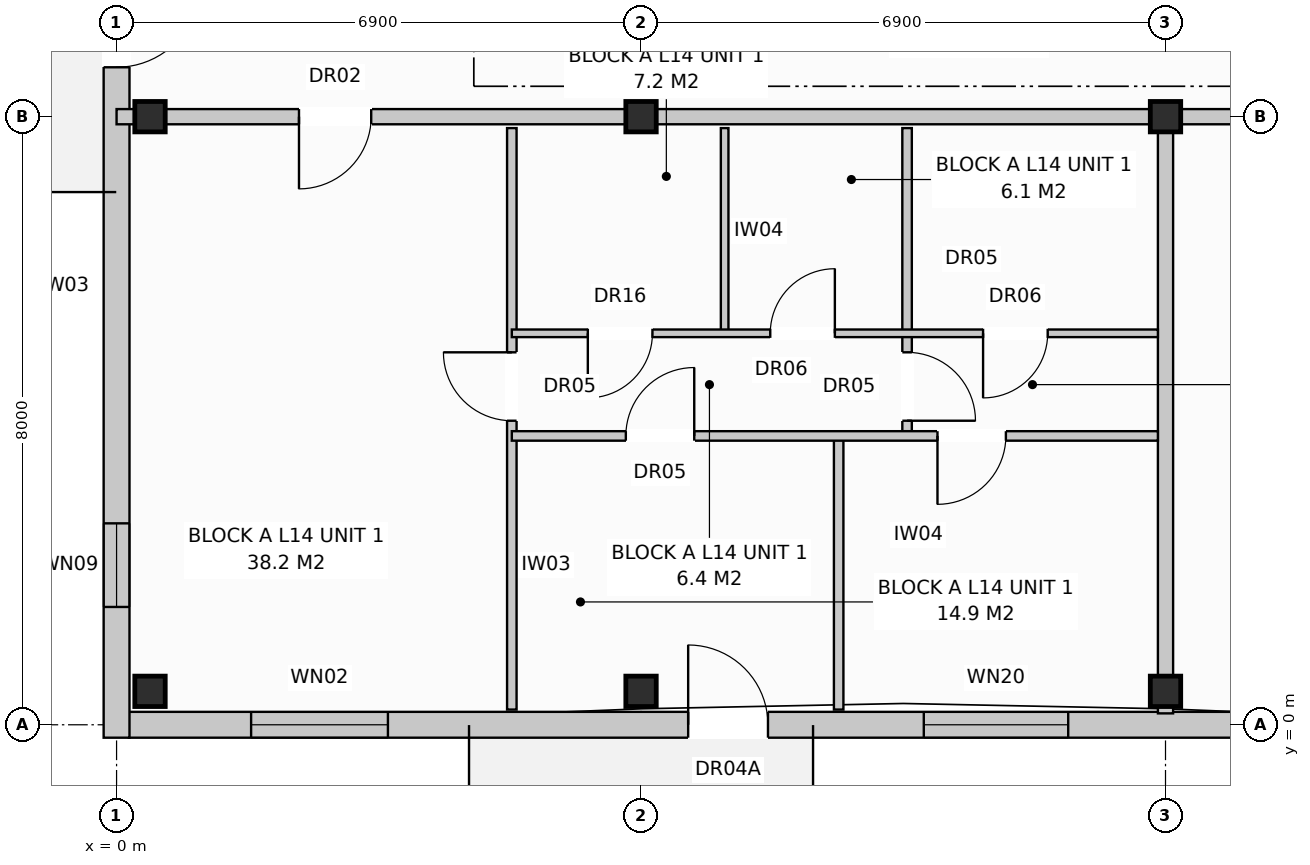
"""IFC4 building model, lengths in metres.
Left out: names, types, materials, properties, quantities, classifications, styles, units other than length and angle.
Written with IfcOpenShell. Run it as: python <this file> out.ifc"""

import sys

from ifc_helpers import new_model, si_unit, direction, frame, frame_2d, origin, origin_with_axes, origin_2d, place, context, subcontext, project, spatial, rectangle, extrude, element, fill, save


model = new_model("IFC4")
c1 = context("Model", 3, precision=1e-05, world=origin(), true_north=direction((0.0, 1.0)))
c2 = subcontext(c1, "Body", "Model", "MODEL_VIEW")
j1 = project(units=[si_unit("LENGTHUNIT", "METRE"), si_unit("PLANEANGLEUNIT", "RADIAN")], contexts=[c1])
p1 = place(None, origin())
s1 = spatial("IfcSite", under=j1, at=p1, CompositionType="ELEMENT")
p2 = place(p1, origin())
s2 = spatial("IfcBuilding", under=s1, at=p2, CompositionType="ELEMENT")
p3 = place(p2, frame((0.0, 0.0, 46.4)))
s3 = spatial("IfcBuildingStorey", under=s2, at=p3, CompositionType="ELEMENT", Elevation=46.4)
for number, where, z_axis, x_axis in (
    (1, (0.44, 0.44, 0.0), (0.0, 0.0, 1.0), (1.0, 0.0, 0.0)),
    (2, (0.44, 8.0, 0.0), (0.0, 0.0, 1.0), (1.0, 0.0, 0.0)),
    (3, (6.9, 0.44, 0.0), (0.0, 0.0, 1.0), (1.0, 0.0, 0.0)),
    (4, (6.9, 8.0, 0.0), (0.0, 0.0, 1.0), (1.0, 0.0, 0.0)),
    (5, (13.8, 0.44, 0.0), (0.0, 0.0, 1.0), (1.0, 0.0, 0.0)),
    (6, (13.8, 8.0, 0.0), (0.0, 0.0, 1.0), (1.0, 0.0, 0.0)),
):
    element("IfcColumn", number, at=place(p3, frame(where, z_axis=z_axis, x_axis=x_axis)), inside=s3, PredefinedType="COLUMN", context=c2, shape_type="SweptSolid", body=[
        extrude(rectangle(XDim=0.4, YDim=0.4, at=origin_2d()), origin(), (0.0, 0.0, 1.0), 3.2),
    ])
p4 = place(p3, frame((0.16, 0.0, 0.0), z_axis=(0.0, 0.0, 1.0), x_axis=(1.0, 0.0, 0.0)))
e7 = element("IfcWall", 7, at=p4, inside=s3, PredefinedType="STANDARD", context=c2, shape_type="SweptSolid", body=[
    extrude(rectangle(XDim=41.08, YDim=0.34, at=frame_2d((20.54, 0.0))), origin(), (0.0, 0.0, 1.0), 2.91),
])
p5 = place(p4, frame((7.36, 0.0, 0.0)))
e8 = element("IfcOpeningElement", 8, at=p5, cuts=e7, PredefinedType="OPENING", context=c2, shape_type="SweptSolid", body=[
    extrude(rectangle(XDim=1.05, YDim=2.12, at=frame_2d((0.525, 1.06))), frame((0.0, 0.182, 0.0), z_axis=(0.0, -1.0, 0.0), x_axis=(1.0, 0.0, 0.0)), (0.0, 0.0, 1.0), 0.364),
])
p6 = place(p4, frame((18.647, 0.0, 0.0)))
e9 = element("IfcOpeningElement", 9, at=p6, cuts=e7, PredefinedType="OPENING", context=c2, shape_type="SweptSolid", body=[
    extrude(rectangle(XDim=1.05, YDim=2.12, at=frame_2d((0.525, 1.06))), frame((0.0, 0.182, 0.0), z_axis=(0.0, -1.0, 0.0), x_axis=(1.0, 0.0, 0.0)), (0.0, 0.0, 1.0), 0.364),
])
p7 = place(p4, frame((32.647, 0.0, 0.0)))
e10 = element("IfcOpeningElement", 10, at=p7, cuts=e7, PredefinedType="OPENING", context=c2, shape_type="SweptSolid", body=[
    extrude(rectangle(XDim=1.05, YDim=2.12, at=frame_2d((0.525, 1.06))), frame((0.0, 0.182, 0.0), z_axis=(0.0, -1.0, 0.0), x_axis=(1.0, 0.0, 0.0)), (0.0, 0.0, 1.0), 0.364),
])
p8 = place(p4, frame((1.61, 0.0, 0.8)))
e11 = element("IfcOpeningElement", 11, at=p8, cuts=e7, PredefinedType="OPENING", context=c2, shape_type="SweptSolid", body=[
    extrude(rectangle(XDim=1.8, YDim=1.7, at=frame_2d((0.9, 0.85))), frame((0.0, 0.182, 0.0), z_axis=(0.0, -1.0, 0.0), x_axis=(1.0, 0.0, 0.0)), (0.0, 0.0, 1.0), 0.364),
])
p9 = place(p4, frame((10.46, 0.0, 0.8)))
e12 = element("IfcOpeningElement", 12, at=p9, cuts=e7, PredefinedType="OPENING", context=c2, shape_type="SweptSolid", body=[
    extrude(rectangle(XDim=1.9, YDim=1.85, at=frame_2d((0.95, 0.925))), frame((0.0, 0.182, 0.0), z_axis=(0.0, -1.0, 0.0), x_axis=(1.0, 0.0, 0.0)), (0.0, 0.0, 1.0), 0.364),
])
p10 = place(p4, frame((15.835, 0.0, 0.8)))
e13 = element("IfcOpeningElement", 13, at=p10, cuts=e7, PredefinedType="OPENING", context=c2, shape_type="SweptSolid", body=[
    extrude(rectangle(XDim=1.95, YDim=1.65, at=frame_2d((0.975, 0.825))), frame((0.0, 0.182, 0.0), z_axis=(0.0, -1.0, 0.0), x_axis=(1.0, 0.0, 0.0)), (0.0, 0.0, 1.0), 0.364),
])
p11 = place(p4, frame((21.96, 0.0, 0.72)))
e14 = element("IfcOpeningElement", 14, at=p11, cuts=e7, PredefinedType="OPENING", context=c2, shape_type="SweptSolid", body=[
    extrude(rectangle(XDim=1.1, YDim=1.5, at=frame_2d((0.55, 0.75))), frame((0.0, 0.182, 0.0), z_axis=(0.0, -1.0, 0.0), x_axis=(1.0, 0.0, 0.0)), (0.0, 0.0, 1.0), 0.364),
])
p12 = place(p4, frame((27.96, 0.0, 0.8)))
e15 = element("IfcOpeningElement", 15, at=p12, cuts=e7, PredefinedType="OPENING", context=c2, shape_type="SweptSolid", body=[
    extrude(rectangle(XDim=1.9, YDim=1.85, at=frame_2d((0.95, 0.925))), frame((0.0, 0.182, 0.0), z_axis=(0.0, -1.0, 0.0), x_axis=(1.0, 0.0, 0.0)), (0.0, 0.0, 1.0), 0.364),
])
p13 = place(p4, frame((30.81, 0.0, 0.85)))
e16 = element("IfcOpeningElement", 16, at=p13, cuts=e7, PredefinedType="OPENING", context=c2, shape_type="SweptSolid", body=[
    extrude(rectangle(XDim=1.5, YDim=1.65, at=frame_2d((0.75, 0.825))), frame((0.0, 0.182, 0.0), z_axis=(0.0, -1.0, 0.0), x_axis=(1.0, 0.0, 0.0)), (0.0, 0.0, 1.0), 0.364),
])
p14 = place(p4, frame((35.76, 0.0, 0.72)))
e17 = element("IfcOpeningElement", 17, at=p14, cuts=e7, PredefinedType="OPENING", context=c2, shape_type="SweptSolid", body=[
    extrude(rectangle(XDim=1.1, YDim=1.5, at=frame_2d((0.55, 0.75))), frame((0.0, 0.182, 0.0), z_axis=(0.0, -1.0, 0.0), x_axis=(1.0, 0.0, 0.0)), (0.0, 0.0, 1.0), 0.364),
])
p15 = place(p4, frame((38.575, 0.0, 0.8)))
e18 = element("IfcOpeningElement", 18, at=p15, cuts=e7, PredefinedType="OPENING", context=c2, shape_type="SweptSolid", body=[
    extrude(rectangle(XDim=1.9, YDim=1.85, at=frame_2d((0.95, 0.925))), frame((0.0, 0.182, 0.0), z_axis=(0.0, -1.0, 0.0), x_axis=(1.0, 0.0, 0.0)), (0.0, 0.0, 1.0), 0.364),
])
p16 = place(p3, frame((0.0, -0.17, 0.0), z_axis=(0.0, 0.0, 1.0), x_axis=(0.0, 1.0, 0.0)))
e19 = element("IfcWall", 19, at=p16, inside=s3, PredefinedType="STANDARD", context=c2, shape_type="SweptSolid", body=[
    extrude(rectangle(XDim=18.74, YDim=0.34, at=frame_2d((9.37, 0.0))), origin(), (0.0, 0.0, 1.0), 2.91),
])
p17 = place(p16, frame((8.82, 0.0, 0.0)))
e20 = element("IfcOpeningElement", 20, at=p17, cuts=e19, PredefinedType="OPENING", context=c2, shape_type="SweptSolid", body=[
    extrude(rectangle(XDim=1.1, YDim=2.1, at=frame_2d((0.55, 1.05))), frame((0.0, 0.182, 0.0), z_axis=(0.0, -1.0, 0.0), x_axis=(1.0, 0.0, 0.0)), (0.0, 0.0, 1.0), 0.364),
])
p18 = place(p16, frame((1.72, 0.0, 0.72)))
e21 = element("IfcOpeningElement", 21, at=p18, cuts=e19, PredefinedType="OPENING", context=c2, shape_type="SweptSolid", body=[
    extrude(rectangle(XDim=1.1, YDim=1.5, at=frame_2d((0.55, 0.75))), frame((0.0, 0.182, 0.0), z_axis=(0.0, -1.0, 0.0), x_axis=(1.0, 0.0, 0.0)), (0.0, 0.0, 1.0), 0.364),
])
p19 = place(p16, frame((15.92, 0.0, 0.72)))
e22 = element("IfcOpeningElement", 22, at=p19, cuts=e19, PredefinedType="OPENING", context=c2, shape_type="SweptSolid", body=[
    extrude(rectangle(XDim=1.1, YDim=1.5, at=frame_2d((0.55, 0.75))), frame((0.0, 0.182, 0.0), z_axis=(0.0, -1.0, 0.0), x_axis=(1.0, 0.0, 0.0)), (0.0, 0.0, 1.0), 0.364),
])
p20 = place(p3, frame((13.8, 7.85, 0.0), z_axis=(0.0, 0.0, 1.0), x_axis=(0.0, -1.0, 0.0)))
e23 = element("IfcWall", 23, at=p20, inside=s3, PredefinedType="PARTITIONING", context=c2, shape_type="SweptSolid", body=[
    extrude(rectangle(XDim=7.7, YDim=0.2, at=frame_2d((3.85, 0.0))), origin(), (0.0, 0.0, 1.0), 2.91),
])
p21 = place(p3, frame((0.0, 8.0, 0.0), z_axis=(0.0, 0.0, 1.0), x_axis=(1.0, 0.0, 0.0)))
e24 = element("IfcWall", 24, at=p21, inside=s3, PredefinedType="PARTITIONING", context=c2, shape_type="SweptSolid", body=[
    extrude(rectangle(XDim=13.8, YDim=0.2, at=frame_2d((6.9, 0.0))), origin(), (0.0, 0.0, 1.0), 2.35),
])
p22 = place(p21, frame((2.4, 0.0, 0.0)))
e25 = element("IfcOpeningElement", 25, at=p22, cuts=e24, PredefinedType="OPENING", context=c2, shape_type="SweptSolid", body=[
    extrude(rectangle(XDim=0.95, YDim=2.15, at=frame_2d((0.475, 1.075))), frame((0.0, 0.112, 0.0), z_axis=(0.0, -1.0, 0.0), x_axis=(1.0, 0.0, 0.0)), (0.0, 0.0, 1.0), 0.224),
])
p23 = place(p3, frame((5.2, 7.85, 0.0), z_axis=(0.0, 0.0, 1.0), x_axis=(0.0, -1.0, 0.0)))
e26 = element("IfcWall", 26, at=p23, inside=s3, PredefinedType="PARTITIONING", context=c2, shape_type="SweptSolid", body=[
    extrude(rectangle(XDim=7.65, YDim=0.125, at=frame_2d((3.825, 0.0))), origin(), (0.0, 0.0, 1.0), 2.91),
])
p24 = place(p23, frame((2.95, 0.0, 0.0)))
e27 = element("IfcOpeningElement", 27, at=p24, cuts=e26, PredefinedType="OPENING", context=c2, shape_type="SweptSolid", body=[
    extrude(rectangle(XDim=0.9, YDim=2.1, at=frame_2d((0.45, 1.05))), frame((0.0, 0.074, 0.0), z_axis=(0.0, -1.0, 0.0), x_axis=(1.0, 0.0, 0.0)), (0.0, 0.0, 1.0), 0.149),
])
p25 = place(p3, frame((8.0, 7.85, 0.0), z_axis=(0.0, 0.0, 1.0), x_axis=(0.0, -1.0, 0.0)))
e28 = element("IfcWall", 28, at=p25, inside=s3, PredefinedType="PARTITIONING", context=c2, shape_type="SweptSolid", body=[
    extrude(rectangle(XDim=2.7, YDim=0.1, at=frame_2d((1.35, 0.0))), origin(), (0.0, 0.0, 1.0), 2.59),
])
p26 = place(p3, frame((10.4, 7.85, 0.0), z_axis=(0.0, 0.0, 1.0), x_axis=(0.0, -1.0, 0.0)))
e29 = element("IfcWall", 29, at=p26, inside=s3, PredefinedType="PARTITIONING", context=c2, shape_type="SweptSolid", body=[
    extrude(rectangle(XDim=4.05, YDim=0.125, at=frame_2d((2.025, 0.0))), origin(), (0.0, 0.0, 1.0), 2.91),
])
p27 = place(p26, frame((2.95, 0.0, 0.0)))
e30 = element("IfcOpeningElement", 30, at=p27, cuts=e29, PredefinedType="OPENING", context=c2, shape_type="SweptSolid", body=[
    extrude(rectangle(XDim=0.9, YDim=2.1, at=frame_2d((0.45, 1.05))), frame((0.0, 0.074, 0.0), z_axis=(0.0, -1.0, 0.0), x_axis=(1.0, 0.0, 0.0)), (0.0, 0.0, 1.0), 0.149),
])
p28 = place(p3, frame((9.5, 3.8, 0.0), z_axis=(0.0, 0.0, 1.0), x_axis=(0.0, -1.0, 0.0)))
e31 = element("IfcWall", 31, at=p28, inside=s3, PredefinedType="PARTITIONING", context=c2, shape_type="SweptSolid", body=[
    extrude(rectangle(XDim=3.6, YDim=0.125, at=frame_2d((1.8, 0.0))), origin(), (0.0, 0.0, 1.0), 2.91),
])
p29 = place(p3, frame((5.2, 5.15, 0.0), z_axis=(0.0, 0.0, 1.0), x_axis=(1.0, 0.0, 0.0)))
e32 = element("IfcWall", 32, at=p29, inside=s3, PredefinedType="PARTITIONING", context=c2, shape_type="SweptSolid", body=[
    extrude(rectangle(XDim=8.5, YDim=0.1, at=frame_2d((4.25, 0.0))), origin(), (0.0, 0.0, 1.0), 2.91),
])
p30 = place(p29, frame((1.0, 0.0, 0.0)))
e33 = element("IfcOpeningElement", 33, at=p30, cuts=e32, PredefinedType="OPENING", context=c2, shape_type="SweptSolid", body=[
    extrude(rectangle(XDim=0.85, YDim=2.1, at=frame_2d((0.425, 1.05))), frame((0.0, 0.062, 0.0), z_axis=(0.0, -1.0, 0.0), x_axis=(1.0, 0.0, 0.0)), (0.0, 0.0, 1.0), 0.124),
])
p31 = place(p29, frame((3.4, 0.0, 0.0)))
e34 = element("IfcOpeningElement", 34, at=p31, cuts=e32, PredefinedType="OPENING", context=c2, shape_type="SweptSolid", body=[
    extrude(rectangle(XDim=0.85, YDim=2.05, at=frame_2d((0.425, 1.025))), frame((0.0, 0.062, 0.0), z_axis=(0.0, -1.0, 0.0), x_axis=(1.0, 0.0, 0.0)), (0.0, 0.0, 1.0), 0.124),
])
p32 = place(p29, frame((6.2, 0.0, 0.0)))
e35 = element("IfcOpeningElement", 35, at=p32, cuts=e32, PredefinedType="OPENING", context=c2, shape_type="SweptSolid", body=[
    extrude(rectangle(XDim=0.85, YDim=2.05, at=frame_2d((0.425, 1.025))), frame((0.0, 0.062, 0.0), z_axis=(0.0, -1.0, 0.0), x_axis=(1.0, 0.0, 0.0)), (0.0, 0.0, 1.0), 0.124),
])
p33 = place(p3, frame((5.2, 3.8, 0.0), z_axis=(0.0, 0.0, 1.0), x_axis=(1.0, 0.0, 0.0)))
e36 = element("IfcWall", 36, at=p33, inside=s3, PredefinedType="PARTITIONING", context=c2, shape_type="SweptSolid", body=[
    extrude(rectangle(XDim=8.5, YDim=0.125, at=frame_2d((4.25, 0.0))), origin(), (0.0, 0.0, 1.0), 2.91),
])
p34 = place(p33, frame((1.5, 0.0, 0.0)))
e37 = element("IfcOpeningElement", 37, at=p34, cuts=e36, PredefinedType="OPENING", context=c2, shape_type="SweptSolid", body=[
    extrude(rectangle(XDim=0.9, YDim=2.1, at=frame_2d((0.45, 1.05))), frame((0.0, 0.074, 0.0), z_axis=(0.0, -1.0, 0.0), x_axis=(1.0, 0.0, 0.0)), (0.0, 0.0, 1.0), 0.149),
])
p35 = place(p33, frame((5.6, 0.0, 0.0)))
e38 = element("IfcOpeningElement", 38, at=p35, cuts=e36, PredefinedType="OPENING", context=c2, shape_type="SweptSolid", body=[
    extrude(rectangle(XDim=0.9, YDim=2.1, at=frame_2d((0.45, 1.05))), frame((0.0, 0.074, 0.0), z_axis=(0.0, -1.0, 0.0), x_axis=(1.0, 0.0, 0.0)), (0.0, 0.0, 1.0), 0.149),
])
p36 = place(p3, frame((13.8, 8.0, 0.0), z_axis=(0.0, 0.0, 1.0), x_axis=(1.0, 0.0, 0.0)))
e39 = element("IfcWall", 39, at=p36, inside=s3, PredefinedType="PARTITIONING", context=c2, shape_type="SweptSolid", body=[
    extrude(rectangle(XDim=20.7, YDim=0.2, at=frame_2d((10.35, 0.0))), origin(), (0.0, 0.0, 1.0), 2.35),
])
p37 = place(p36, frame((2.4, 0.0, 0.0)))
e40 = element("IfcOpeningElement", 40, at=p37, cuts=e39, PredefinedType="OPENING", context=c2, shape_type="SweptSolid", body=[
    extrude(rectangle(XDim=0.95, YDim=2.15, at=frame_2d((0.475, 1.075))), frame((0.0, 0.112, 0.0), z_axis=(0.0, -1.0, 0.0), x_axis=(1.0, 0.0, 0.0)), (0.0, 0.0, 1.0), 0.224),
])
p38 = place(p5, origin_with_axes())
e41 = element("IfcDoor", 41, at=p38, inside=s3, OperationType="SINGLE_SWING_LEFT", PredefinedType="DOOR", context=c2, shape_type="SweptSolid", body=[
    extrude(rectangle(XDim=1.05, YDim=2.12, at=frame_2d((0.525, 1.06))), frame((0.0, 0.025, 0.0), z_axis=(0.0, -1.0, 0.0), x_axis=(1.0, 0.0, 0.0)), (0.0, 0.0, 1.0), 0.05),
])
fill(e8, e41)
p39 = place(p8, origin_with_axes())
e42 = element("IfcWindow", 42, at=p39, inside=s3, PartitioningType="SINGLE_PANEL", PredefinedType="WINDOW", context=c2, shape_type="SweptSolid", body=[
    extrude(rectangle(XDim=1.8, YDim=1.7, at=frame_2d((0.9, 0.85))), frame((0.0, 0.03, 0.0), z_axis=(0.0, -1.0, 0.0), x_axis=(1.0, 0.0, 0.0)), (0.0, 0.0, 1.0), 0.06),
])
fill(e11, e42)
p40 = place(p9, origin_with_axes())
e43 = element("IfcWindow", 43, at=p40, inside=s3, PartitioningType="SINGLE_PANEL", PredefinedType="WINDOW", context=c2, shape_type="SweptSolid", body=[
    extrude(rectangle(XDim=1.9, YDim=1.85, at=frame_2d((0.95, 0.925))), frame((0.0, 0.03, 0.0), z_axis=(0.0, -1.0, 0.0), x_axis=(1.0, 0.0, 0.0)), (0.0, 0.0, 1.0), 0.06),
])
fill(e12, e43)
p41 = place(p17, frame((1.1, 0.0, 0.0), z_axis=(0.0, 0.0, 1.0), x_axis=(-1.0, 0.0, 0.0)))
e44 = element("IfcDoor", 44, at=p41, inside=s3, OperationType="SINGLE_SWING_RIGHT", PredefinedType="DOOR", context=c2, shape_type="SweptSolid", body=[
    extrude(rectangle(XDim=1.1, YDim=2.1, at=frame_2d((0.55, 1.05))), frame((0.0, 0.025, 0.0), z_axis=(0.0, -1.0, 0.0), x_axis=(1.0, 0.0, 0.0)), (0.0, 0.0, 1.0), 0.05),
])
fill(e20, e44)
p42 = place(p18, origin_with_axes())
e45 = element("IfcWindow", 45, at=p42, inside=s3, PartitioningType="SINGLE_PANEL", PredefinedType="WINDOW", context=c2, shape_type="SweptSolid", body=[
    extrude(rectangle(XDim=1.1, YDim=1.5, at=frame_2d((0.55, 0.75))), frame((0.0, 0.03, 0.0), z_axis=(0.0, -1.0, 0.0), x_axis=(1.0, 0.0, 0.0)), (0.0, 0.0, 1.0), 0.06),
])
fill(e21, e45)
p43 = place(p22, frame((0.95, 0.0, 0.0), z_axis=(0.0, 0.0, 1.0), x_axis=(-1.0, 0.0, 0.0)))
e46 = element("IfcDoor", 46, at=p43, inside=s3, OperationType="SINGLE_SWING_LEFT", PredefinedType="DOOR", context=c2, shape_type="SweptSolid", body=[
    extrude(rectangle(XDim=0.95, YDim=2.15, at=frame_2d((0.475, 1.075))), frame((0.0, 0.025, 0.0), z_axis=(0.0, -1.0, 0.0), x_axis=(1.0, 0.0, 0.0)), (0.0, 0.0, 1.0), 0.05),
])
fill(e25, e46)
p44 = place(p24, frame((0.9, 0.0, 0.0), z_axis=(0.0, 0.0, 1.0), x_axis=(-1.0, 0.0, 0.0)))
e47 = element("IfcDoor", 47, at=p44, inside=s3, OperationType="SINGLE_SWING_LEFT", PredefinedType="DOOR", context=c2, shape_type="SweptSolid", body=[
    extrude(rectangle(XDim=0.9, YDim=2.1, at=frame_2d((0.45, 1.05))), frame((0.0, 0.025, 0.0), z_axis=(0.0, -1.0, 0.0), x_axis=(1.0, 0.0, 0.0)), (0.0, 0.0, 1.0), 0.05),
])
fill(e27, e47)
p45 = place(p27, origin_with_axes())
e48 = element("IfcDoor", 48, at=p45, inside=s3, OperationType="SINGLE_SWING_RIGHT", PredefinedType="DOOR", context=c2, shape_type="SweptSolid", body=[
    extrude(rectangle(XDim=0.9, YDim=2.1, at=frame_2d((0.45, 1.05))), frame((0.0, 0.025, 0.0), z_axis=(0.0, -1.0, 0.0), x_axis=(1.0, 0.0, 0.0)), (0.0, 0.0, 1.0), 0.05),
])
fill(e30, e48)
p46 = place(p30, frame((0.85, 0.0, 0.0), z_axis=(0.0, 0.0, 1.0), x_axis=(-1.0, 0.0, 0.0)))
e49 = element("IfcDoor", 49, at=p46, inside=s3, OperationType="SINGLE_SWING_LEFT", PredefinedType="DOOR", context=c2, shape_type="SweptSolid", body=[
    extrude(rectangle(XDim=0.85, YDim=2.1, at=frame_2d((0.425, 1.05))), frame((0.0, 0.025, 0.0), z_axis=(0.0, -1.0, 0.0), x_axis=(1.0, 0.0, 0.0)), (0.0, 0.0, 1.0), 0.05),
])
fill(e33, e49)
p47 = place(p31, origin_with_axes())
e50 = element("IfcDoor", 50, at=p47, inside=s3, OperationType="SINGLE_SWING_RIGHT", PredefinedType="DOOR", context=c2, shape_type="SweptSolid", body=[
    extrude(rectangle(XDim=0.85, YDim=2.05, at=frame_2d((0.425, 1.025))), frame((0.0, 0.025, 0.0), z_axis=(0.0, -1.0, 0.0), x_axis=(1.0, 0.0, 0.0)), (0.0, 0.0, 1.0), 0.05),
])
fill(e34, e50)
p48 = place(p32, frame((0.85, 0.0, 0.0), z_axis=(0.0, 0.0, 1.0), x_axis=(-1.0, 0.0, 0.0)))
e51 = element("IfcDoor", 51, at=p48, inside=s3, OperationType="SINGLE_SWING_LEFT", PredefinedType="DOOR", context=c2, shape_type="SweptSolid", body=[
    extrude(rectangle(XDim=0.85, YDim=2.05, at=frame_2d((0.425, 1.025))), frame((0.0, 0.025, 0.0), z_axis=(0.0, -1.0, 0.0), x_axis=(1.0, 0.0, 0.0)), (0.0, 0.0, 1.0), 0.05),
])
fill(e35, e51)
p49 = place(p34, origin_with_axes())
e52 = element("IfcDoor", 52, at=p49, inside=s3, OperationType="SINGLE_SWING_RIGHT", PredefinedType="DOOR", context=c2, shape_type="SweptSolid", body=[
    extrude(rectangle(XDim=0.9, YDim=2.1, at=frame_2d((0.45, 1.05))), frame((0.0, 0.025, 0.0), z_axis=(0.0, -1.0, 0.0), x_axis=(1.0, 0.0, 0.0)), (0.0, 0.0, 1.0), 0.05),
])
fill(e37, e52)
p50 = place(p35, frame((0.9, 0.0, 0.0), z_axis=(0.0, 0.0, 1.0), x_axis=(-1.0, 0.0, 0.0)))
e53 = element("IfcDoor", 53, at=p50, inside=s3, OperationType="SINGLE_SWING_LEFT", PredefinedType="DOOR", context=c2, shape_type="SweptSolid", body=[
    extrude(rectangle(XDim=0.9, YDim=2.1, at=frame_2d((0.45, 1.05))), frame((0.0, 0.025, 0.0), z_axis=(0.0, -1.0, 0.0), x_axis=(1.0, 0.0, 0.0)), (0.0, 0.0, 1.0), 0.05),
])
fill(e38, e53)
save(model, sys.argv[1])
